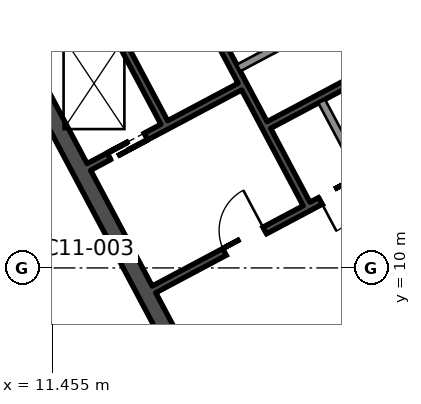
"""IFC4 building model, lengths in metres.
Left out: names, types, materials, properties, quantities, classifications, styles, units other than length and angle.
Written with IfcOpenShell. Run it as: python <this file> out.ifc"""

import sys

from ifc_helpers import new_model, si_unit, direction, frame, frame_2d, origin, place, context, subcontext, project, spatial, rectangle, extrude, element, fill, save


model = new_model("IFC4")
c1 = context("Model", 3, precision=1e-05, world=origin(), true_north=direction((0.0, 1.0)))
c2 = subcontext(c1, "Body", "Model", "MODEL_VIEW")
j1 = project(units=[si_unit("LENGTHUNIT", "METRE"), si_unit("PLANEANGLEUNIT", "RADIAN")], contexts=[c1])
p1 = place(None, origin())
s1 = spatial("IfcSite", under=j1, at=p1, CompositionType="ELEMENT")
p2 = place(p1, origin())
s2 = spatial("IfcBuilding", under=s1, at=p2, CompositionType="ELEMENT")
p3 = place(p2, frame((0.0, 0.0, 273.6)))
s3 = spatial("IfcBuildingStorey", under=s2, at=p3, CompositionType="ELEMENT", Elevation=273.6)
p4 = place(p3, frame((19.207, -0.604, 0.0), z_axis=(0.0, 0.0, 1.0), x_axis=(-0.469467968382, 0.882949504028, 0.0)))
e1 = element("IfcWall", 1, at=p4, inside=s3, PredefinedType="SHEAR", context=c2, shape_type="SweptSolid", body=[
    extrude(rectangle(XDim=19.1, YDim=0.45, at=frame_2d((9.55, 0.0))), origin(), (0.0, 0.0, 1.0), 3.9),
])
p5 = place(p4, frame((6.55, 0.0, 0.0)))
e2 = element("IfcOpeningElement", 2, at=p5, cuts=e1, PredefinedType="OPENING", context=c2, shape_type="SweptSolid", body=[
    extrude(rectangle(XDim=2.4, YDim=2.4, at=frame_2d((1.2, 1.2))), frame((0.0, 0.235, 0.0), z_axis=(0.0, -1.0, 0.0), x_axis=(1.0, 0.0, 0.0)), (0.0, 0.0, 1.0), 0.47),
])
p6 = place(p3, frame((14.394, 13.826, 0.0), z_axis=(0.0, 0.0, 1.0), x_axis=(-0.469494272526, 0.882935517501, 0.0)))
e3 = element("IfcWall", 3, at=p6, inside=s3, PredefinedType="SHEAR", context=c2, shape_type="SweptSolid", body=[
    extrude(rectangle(XDim=3.65, YDim=0.2, at=frame_2d((1.825, 0.0))), origin(), (0.0, 0.0, 1.0), 3.9),
])
p7 = place(p3, frame((18.138, 11.683, 0.0), z_axis=(0.0, 0.0, 1.0), x_axis=(-0.469480409012, 0.88294288918, 0.0)))
e4 = element("IfcWall", 4, at=p7, inside=s3, PredefinedType="SHEAR", context=c2, shape_type="SweptSolid", body=[
    extrude(rectangle(XDim=7.3, YDim=0.2, at=frame_2d((3.65, 0.0))), origin(), (0.0, 0.0, 1.0), 3.9),
])
p8 = place(p3, frame((19.569, 12.444, 0.0), z_axis=(0.0, 0.0, 1.0), x_axis=(-0.4694473164, 0.882960484464, 0.0)))
e5 = element("IfcWall", 5, at=p8, inside=s3, PredefinedType="SOLIDWALL", context=c2, shape_type="SweptSolid", body=[
    extrude(rectangle(XDim=2.2, YDim=0.2, at=frame_2d((1.1, 0.0))), origin(), (0.0, 0.0, 1.0), 3.9),
])
p9 = place(p3, frame((18.104, 7.701, 0.0), z_axis=(0.0, 0.0, 1.0), x_axis=(0.882952937579, 0.469461510692, 0.0)))
e6 = element("IfcWall", 6, at=p9, inside=s3, PredefinedType="SHEAR", context=c2, shape_type="SweptSolid", body=[
    extrude(rectangle(XDim=5.4, YDim=0.2, at=frame_2d((2.7, 0.0))), origin(), (0.0, 0.0, 1.0), 3.9),
])
p10 = place(p9, frame((0.36, 0.0, 0.0)))
e7 = element("IfcOpeningElement", 7, at=p10, cuts=e6, PredefinedType="OPENING", context=c2, shape_type="SweptSolid", body=[
    extrude(rectangle(XDim=0.9, YDim=2.1, at=frame_2d((0.45, 1.05))), frame((0.0, 0.11, 0.0), z_axis=(0.0, -1.0, 0.0), x_axis=(1.0, 0.0, 0.0)), (0.0, 0.0, 1.0), 0.22),
])
p11 = place(p9, frame((3.06, 0.0, 0.0)))
e8 = element("IfcOpeningElement", 8, at=p11, cuts=e6, PredefinedType="OPENING", context=c2, shape_type="SweptSolid", body=[
    extrude(rectangle(XDim=0.9, YDim=2.1, at=frame_2d((0.45, 1.05))), frame((0.0, 0.11, 0.0), z_axis=(0.0, -1.0, 0.0), x_axis=(1.0, 0.0, 0.0)), (0.0, 0.0, 1.0), 0.22),
])
p12 = place(p3, frame((14.124, 9.435, 0.0), z_axis=(0.0, 0.0, 1.0), x_axis=(0.882940221191, 0.469485426614, 0.0)))
e9 = element("IfcWall", 9, at=p12, inside=s3, PredefinedType="SHEAR", context=c2, shape_type="SweptSolid", body=[
    extrude(rectangle(XDim=10.0, YDim=0.2, at=frame_2d((5.0, 0.0))), origin(), (0.0, 0.0, 1.0), 3.9),
])
p13 = place(p12, frame((2.1, 0.0, 0.0)))
e10 = element("IfcOpeningElement", 10, at=p13, cuts=e9, PredefinedType="OPENING", context=c2, shape_type="SweptSolid", body=[
    extrude(rectangle(XDim=1.2, YDim=2.1, at=frame_2d((0.6, 1.05))), frame((0.0, 0.11, 0.0), z_axis=(0.0, -1.0, 0.0), x_axis=(1.0, 0.0, 0.0)), (0.0, 0.0, 1.0), 0.22),
])
p14 = place(p12, frame((4.96, 0.0, 0.0)))
e11 = element("IfcOpeningElement", 11, at=p14, cuts=e9, PredefinedType="OPENING", context=c2, shape_type="SweptSolid", body=[
    extrude(rectangle(XDim=0.9, YDim=2.1, at=frame_2d((0.45, 1.05))), frame((0.0, 0.11, 0.0), z_axis=(0.0, -1.0, 0.0), x_axis=(1.0, 0.0, 0.0)), (0.0, 0.0, 1.0), 0.22),
])
p15 = place(p12, frame((7.66, 0.0, 0.0)))
e12 = element("IfcOpeningElement", 12, at=p15, cuts=e9, PredefinedType="OPENING", context=c2, shape_type="SweptSolid", body=[
    extrude(rectangle(XDim=0.9, YDim=2.1, at=frame_2d((0.45, 1.05))), frame((0.0, 0.11, 0.0), z_axis=(0.0, -1.0, 0.0), x_axis=(1.0, 0.0, 0.0)), (0.0, 0.0, 1.0), 0.22),
])
p16 = place(p3, frame((17.147, 13.761, 0.0), z_axis=(0.0, 0.0, 1.0), x_axis=(0.882964314875, 0.469440111896, 0.0)))
e13 = element("IfcWall", 13, at=p16, inside=s3, PredefinedType="SHEAR", context=c2, shape_type="SweptSolid", body=[
    extrude(rectangle(XDim=5.2, YDim=0.2, at=frame_2d((2.6, 0.0))), origin(), (0.0, 0.0, 1.0), 3.9),
])
p17 = place(p3, frame((12.41, 12.658, 0.0), z_axis=(0.0, 0.0, 1.0), x_axis=(0.8829484765, 0.469469900894, 0.0)))
e14 = element("IfcWall", 14, at=p17, inside=s3, PredefinedType="SHEAR", context=c2, shape_type="SweptSolid", body=[
    extrude(rectangle(XDim=4.5, YDim=0.2, at=frame_2d((2.25, 0.0))), origin(), (0.0, 0.0, 1.0), 3.9),
])
p18 = place(p17, frame((0.6, 0.0, 0.0)))
e15 = element("IfcOpeningElement", 15, at=p18, cuts=e14, PredefinedType="OPENING", context=c2, shape_type="SweptSolid", body=[
    extrude(rectangle(XDim=1.1, YDim=2.1, at=frame_2d((0.55, 1.05))), frame((0.0, 0.11, 0.0), z_axis=(0.0, -1.0, 0.0), x_axis=(1.0, 0.0, 0.0)), (0.0, 0.0, 1.0), 0.22),
])
p19 = place(p3, frame((16.349, 15.262, 0.0), z_axis=(0.0, 0.0, 1.0), x_axis=(0.882953967957, 0.469459572775, 0.0)))
e16 = element("IfcWall", 16, at=p19, inside=s3, PredefinedType="SOLIDWALL", context=c2, shape_type="SweptSolid", body=[
    extrude(rectangle(XDim=5.2, YDim=0.2, at=frame_2d((2.6, 0.0))), origin(), (0.0, 0.0, 1.0), 3.9),
])
p20 = place(p3, frame((0.0, 13.817, 0.0), z_axis=(0.0, 0.0, 1.0), x_axis=(0.882939200239, 0.469487346668, 0.0)))
e17 = element("IfcWall", 17, at=p20, inside=s3, PredefinedType="PARTITIONING", context=c2, shape_type="SweptSolid", body=[
    extrude(rectangle(XDim=33.714, YDim=0.15, at=frame_2d((16.857, 0.0))), origin(), (0.0, 0.0, 1.0), 3.54),
])
p21 = place(p20, frame((15.95, 0.0, 0.0)))
e18 = element("IfcOpeningElement", 18, at=p21, cuts=e17, PredefinedType="OPENING", context=c2, shape_type="SweptSolid", body=[
    extrude(rectangle(XDim=1.8, YDim=2.1, at=frame_2d((0.9, 1.05))), frame((0.0, 0.085, 0.0), z_axis=(0.0, -1.0, 0.0), x_axis=(1.0, 0.0, 0.0)), (0.0, 0.0, 1.0), 0.17),
])
p22 = place(p13, origin())
e19 = element("IfcDoor", 19, at=p22, inside=s3, OperationType="SINGLE_SWING_RIGHT", PredefinedType="DOOR", context=c2, shape_type="SweptSolid", body=[
    extrude(rectangle(XDim=1.2, YDim=2.1, at=frame_2d((0.6, 1.05))), frame((0.0, 0.025, 0.0), z_axis=(0.0, -1.0, 0.0), x_axis=(1.0, 0.0, 0.0)), (0.0, 0.0, 1.0), 0.05),
])
fill(e10, e19)
p23 = place(p14, frame((0.9, 0.0, 0.0), z_axis=(0.0, 0.0, 1.0), x_axis=(-1.0, 0.0, 0.0)))
e20 = element("IfcDoor", 20, at=p23, inside=s3, OperationType="SINGLE_SWING_RIGHT", PredefinedType="DOOR", context=c2, shape_type="SweptSolid", body=[
    extrude(rectangle(XDim=0.9, YDim=2.1, at=frame_2d((0.45, 1.05))), frame((0.0, 0.025, 0.0), z_axis=(0.0, -1.0, 0.0), x_axis=(1.0, 0.0, 0.0)), (0.0, 0.0, 1.0), 0.05),
])
fill(e11, e20)
p24 = place(p18, origin())
e21 = element("IfcDoor", 21, at=p24, inside=s3, OperationType="DOUBLE_DOOR_SLIDING", PredefinedType="DOOR", context=c2, shape_type="SweptSolid", body=[
    extrude(rectangle(XDim=1.1, YDim=2.1, at=frame_2d((0.55, 1.05))), frame((0.0, 0.025, 0.0), z_axis=(0.0, -1.0, 0.0), x_axis=(1.0, 0.0, 0.0)), (0.0, 0.0, 1.0), 0.05),
])
fill(e15, e21)
save(model, sys.argv[1])
